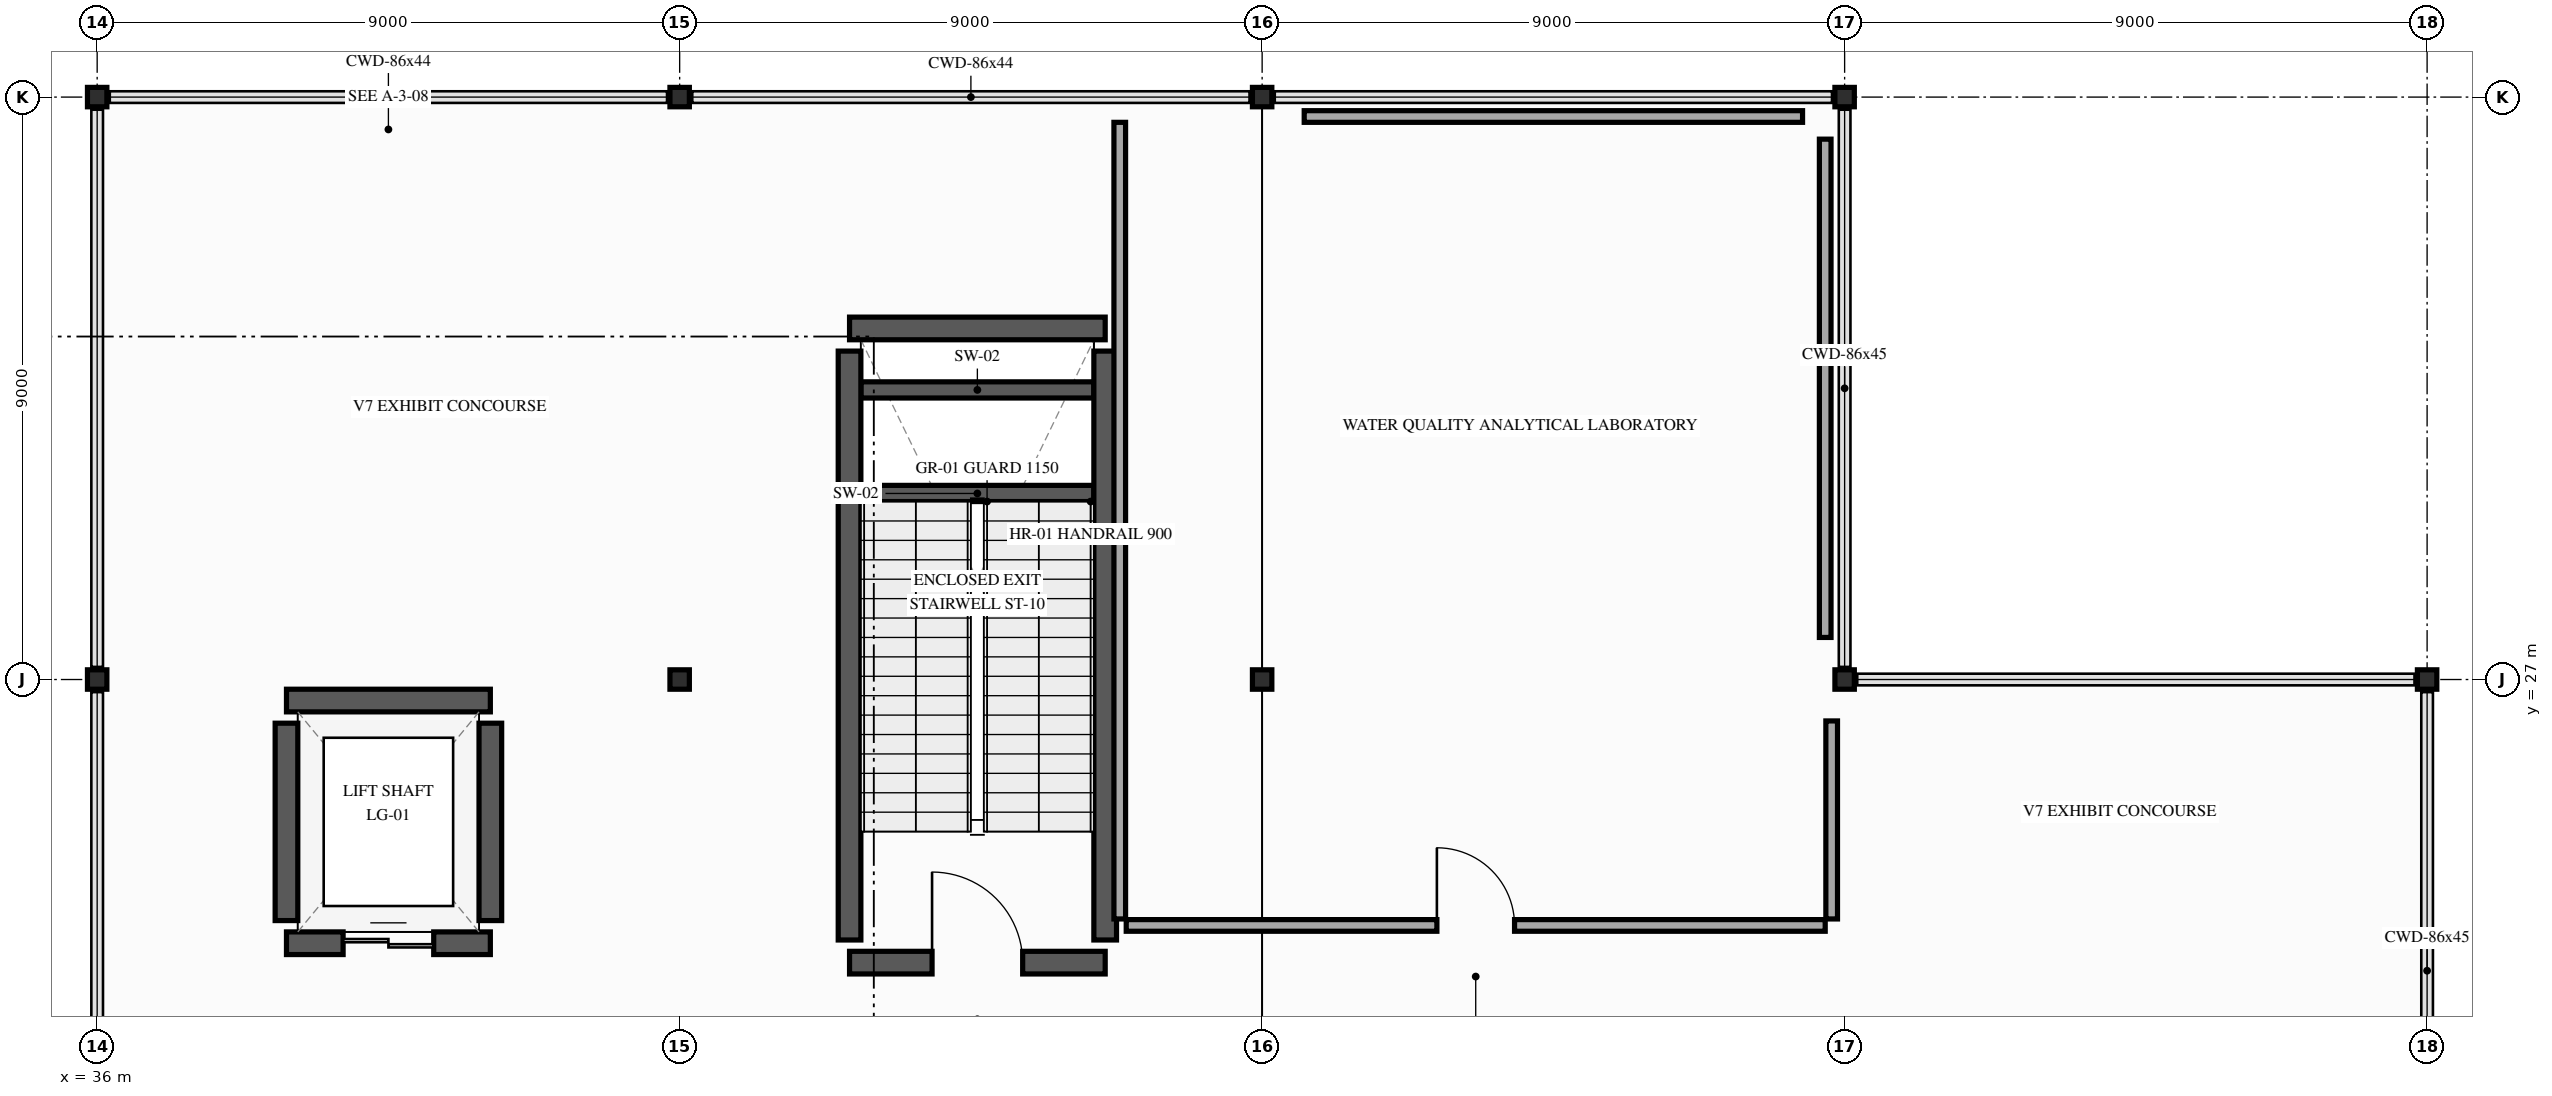
"""IFC4 building model, lengths in metres.
Left out: names, types, materials, properties, quantities, classifications, styles, units other than length and angle.
Written with IfcOpenShell. Run it as: python <this file> out.ifc"""

import sys

from ifc_helpers import new_model, si_unit, direction, frame, frame_2d, origin, origin_2d, place, context, subcontext, project, spatial, rectangle, i_section, extrude, element, fill, save


model = new_model("IFC4")
c1 = context("Model", 3, precision=1e-05, world=origin(), true_north=direction((0.0, 1.0)))
c2 = subcontext(c1, "Body", "Model", "MODEL_VIEW")
j1 = project(units=[si_unit("LENGTHUNIT", "METRE"), si_unit("PLANEANGLEUNIT", "RADIAN")], contexts=[c1])
p1 = place(None, origin())
s1 = spatial("IfcSite", under=j1, at=p1, CompositionType="ELEMENT")
p2 = place(p1, origin())
s2 = spatial("IfcBuilding", under=s1, at=p2, CompositionType="ELEMENT")
p3 = place(p2, frame((0.0, 0.0, 10.8)))
s3 = spatial("IfcBuildingStorey", under=s2, at=p3, CompositionType="ELEMENT", Elevation=10.8)
for number, where, z_axis, x_axis in (
    (1, (36.0, 27.0, 0.0), (0.0, 0.0, 1.0), (1.0, 0.0, 0.0)),
    (2, (36.0, 36.0, 0.0), (0.0, 0.0, 1.0), (1.0, 0.0, 0.0)),
    (3, (45.0, 27.0, 0.0), (0.0, 0.0, 1.0), (1.0, 0.0, 0.0)),
    (4, (45.0, 36.0, 0.0), (0.0, 0.0, 1.0), (1.0, 0.0, 0.0)),
    (5, (54.0, 27.0, 0.0), (0.0, 0.0, 1.0), (1.0, 0.0, 0.0)),
    (6, (54.0, 36.0, 0.0), (0.0, 0.0, 1.0), (1.0, 0.0, 0.0)),
    (7, (63.0, 27.0, 0.0), (0.0, 0.0, 1.0), (1.0, 0.0, 0.0)),
    (8, (63.0, 36.0, 0.0), (0.0, 0.0, 1.0), (1.0, 0.0, 0.0)),
    (9, (72.0, 27.0, 0.0), (0.0, 0.0, 1.0), (1.0, 0.0, 0.0)),
):
    element("IfcColumn", number, at=place(p3, frame(where, z_axis=z_axis, x_axis=x_axis)), inside=s3, PredefinedType="COLUMN", context=c2, shape_type="SweptSolid", body=[
        extrude(i_section(OverallWidth=0.3, OverallDepth=0.3, WebThickness=0.01, FlangeThickness=0.015, FilletRadius=0.018, at=origin_2d()), origin(), (0.0, 0.0, 1.0), 5.4),
    ])
for number, where, z_axis, x_axis in (
    (10, (47.8, 29.875, 0.0), (0.0, 0.0, 1.0), (1.0, 0.0, 0.0)),
    (11, (47.8, 31.475, 0.0), (0.0, 0.0, 1.0), (1.0, 0.0, 0.0)),
):
    element("IfcWall", number, at=place(p3, frame(where, z_axis=z_axis, x_axis=x_axis)), inside=s3, PredefinedType="SHEAR", context=c2, shape_type="SweptSolid", body=[
        extrude(rectangle(XDim=3.6, YDim=0.25, at=frame_2d((1.8, 0.0))), origin(), (0.0, 0.0, 1.0), 2.5),
    ])
p4 = place(p3, frame((47.625, 22.625, 0.0), z_axis=(0.0, 0.0, 1.0), x_axis=(1.0, 0.0, 0.0)))
e12 = element("IfcWall", 12, at=p4, inside=s3, PredefinedType="SHEAR", context=c2, shape_type="SweptSolid", body=[
    extrude(rectangle(XDim=3.95, YDim=0.35, at=frame_2d((1.975, 0.0))), origin(), (0.0, 0.0, 1.0), 5.16),
])
p5 = place(p4, frame((1.275, 0.0, 0.0)))
e13 = element("IfcOpeningElement", 13, at=p5, cuts=e12, PredefinedType="OPENING", context=c2, shape_type="SweptSolid", body=[
    extrude(rectangle(XDim=1.4, YDim=2.2, at=frame_2d((0.7, 1.1))), frame((0.0, 0.185, 0.0), z_axis=(0.0, -1.0, 0.0), x_axis=(1.0, 0.0, 0.0)), (0.0, 0.0, 1.0), 0.37),
])
p6 = place(p3, frame((47.625, 32.425, 0.0), z_axis=(0.0, 0.0, 1.0), x_axis=(1.0, 0.0, 0.0)))
e14 = element("IfcWall", 14, at=p6, inside=s3, PredefinedType="SHEAR", context=c2, shape_type="SweptSolid", body=[
    extrude(rectangle(XDim=3.95, YDim=0.35, at=frame_2d((1.975, 0.0))), origin(), (0.0, 0.0, 1.0), 5.16),
])
for number, where, z_axis, x_axis in (
    (15, (47.625, 22.975, 0.0), (0.0, 0.0, 1.0), (0.0, 1.0, 0.0)),
    (16, (51.575, 22.975, 0.0), (0.0, 0.0, 1.0), (0.0, 1.0, 0.0)),
):
    element("IfcWall", number, at=place(p3, frame(where, z_axis=z_axis, x_axis=x_axis)), inside=s3, PredefinedType="SHEAR", context=c2, shape_type="SweptSolid", body=[
        extrude(rectangle(XDim=9.1, YDim=0.35, at=frame_2d((4.55, 0.0))), origin(), (0.0, 0.0, 1.0), 5.16),
    ])
p7 = place(p3, frame((38.925, 22.925, 0.0), z_axis=(0.0, 0.0, 1.0), x_axis=(1.0, 0.0, 0.0)))
e17 = element("IfcWall", 17, at=p7, inside=s3, PredefinedType="SHEAR", context=c2, shape_type="SweptSolid", body=[
    extrude(rectangle(XDim=3.15, YDim=0.35, at=frame_2d((1.575, 0.0))), origin(), (0.0, 0.0, 1.0), 5.16),
])
p8 = place(p7, frame((0.875, 0.0, 0.0)))
e18 = element("IfcOpeningElement", 18, at=p8, cuts=e17, PredefinedType="OPENING", context=c2, shape_type="SweptSolid", body=[
    extrude(rectangle(XDim=1.4, YDim=2.3, at=frame_2d((0.7, 1.15))), frame((0.0, 0.185, 0.0), z_axis=(0.0, -1.0, 0.0), x_axis=(1.0, 0.0, 0.0)), (0.0, 0.0, 1.0), 0.37),
])
p9 = place(p3, frame((42.075, 26.675, 0.0), z_axis=(0.0, 0.0, 1.0), x_axis=(-1.0, 0.0, 0.0)))
e19 = element("IfcWall", 19, at=p9, inside=s3, PredefinedType="SHEAR", context=c2, shape_type="SweptSolid", body=[
    extrude(rectangle(XDim=3.15, YDim=0.35, at=frame_2d((1.575, 0.0))), origin(), (0.0, 0.0, 1.0), 5.16),
])
for number, where, z_axis, x_axis in (
    (20, (38.925, 23.275, 0.0), (0.0, 0.0, 1.0), (0.0, 1.0, 0.0)),
    (21, (42.075, 23.275, 0.0), (0.0, 0.0, 1.0), (0.0, 1.0, 0.0)),
):
    element("IfcWall", number, at=place(p3, frame(where, z_axis=z_axis, x_axis=x_axis)), inside=s3, PredefinedType="SHEAR", context=c2, shape_type="SweptSolid", body=[
        extrude(rectangle(XDim=3.05, YDim=0.35, at=frame_2d((1.525, 0.0))), origin(), (0.0, 0.0, 1.0), 5.16),
    ])
p10 = place(p3, frame((51.8, 35.61, 0.0), z_axis=(0.0, 0.0, 1.0), x_axis=(0.0, -1.0, 0.0)))
e22 = element("IfcWall", 22, at=p10, inside=s3, PredefinedType="PARTITIONING", context=c2, shape_type="SweptSolid", body=[
    extrude(rectangle(XDim=12.31, YDim=0.18, at=frame_2d((6.155, 0.0))), origin(), (0.0, 0.0, 1.0), 4.447),
])
p11 = place(p3, frame((51.9, 23.2, 0.0), z_axis=(0.0, 0.0, 1.0), x_axis=(1.0, 0.0, 0.0)))
e23 = element("IfcWall", 23, at=p11, inside=s3, PredefinedType="PARTITIONING", context=c2, shape_type="SweptSolid", body=[
    extrude(rectangle(XDim=10.8, YDim=0.18, at=frame_2d((5.4, 0.0))), origin(), (0.0, 0.0, 1.0), 4.547),
])
p12 = place(p11, frame((4.8, 0.0, 0.0)))
e24 = element("IfcOpeningElement", 24, at=p12, cuts=e23, PredefinedType="OPENING", context=c2, shape_type="SweptSolid", body=[
    extrude(rectangle(XDim=1.2, YDim=2.2, at=frame_2d((0.6, 1.1))), frame((0.0, 0.1, 0.0), z_axis=(0.0, -1.0, 0.0), x_axis=(1.0, 0.0, 0.0)), (0.0, 0.0, 1.0), 0.2),
])
p13 = place(p3, frame((62.8, 23.3, 0.0), z_axis=(0.0, 0.0, 1.0), x_axis=(0.0, 1.0, 0.0)))
e25 = element("IfcWall", 25, at=p13, inside=s3, PredefinedType="PARTITIONING", context=c2, shape_type="SweptSolid", body=[
    extrude(rectangle(XDim=3.06, YDim=0.18, at=frame_2d((1.53, 0.0))), origin(), (0.0, 0.0, 1.0), 4.535),
])
p14 = place(p3, frame((62.7, 27.65, 0.0), z_axis=(0.0, 0.0, 1.0), x_axis=(0.0, 1.0, 0.0)))
e26 = element("IfcWall", 26, at=p14, inside=s3, PredefinedType="PARTITIONING", context=c2, shape_type="SweptSolid", body=[
    extrude(rectangle(XDim=7.7, YDim=0.18, at=frame_2d((3.85, 0.0))), origin(), (0.0, 0.0, 1.0), 4.547),
])
p15 = place(p3, frame((62.35, 35.7, 0.0), z_axis=(0.0, 0.0, 1.0), x_axis=(-1.0, 0.0, 0.0)))
e27 = element("IfcWall", 27, at=p15, inside=s3, PredefinedType="PARTITIONING", context=c2, shape_type="SweptSolid", body=[
    extrude(rectangle(XDim=7.7, YDim=0.18, at=frame_2d((3.85, 0.0))), origin(), (0.0, 0.0, 1.0), 4.447),
])
p16 = place(p5, origin())
e28 = element("IfcDoor", 28, at=p16, inside=s3, OperationType="SINGLE_SWING_LEFT", PredefinedType="DOOR", context=c2, shape_type="SweptSolid", body=[
    extrude(rectangle(XDim=1.4, YDim=2.2, at=frame_2d((0.7, 1.1))), frame((0.0, 0.025, 0.0), z_axis=(0.0, -1.0, 0.0), x_axis=(1.0, 0.0, 0.0)), (0.0, 0.0, 1.0), 0.05),
])
fill(e13, e28)
p17 = place(p8, origin())
e29 = element("IfcDoor", 29, at=p17, inside=s3, OperationType="DOUBLE_DOOR_SLIDING", PredefinedType="DOOR", context=c2, shape_type="SweptSolid", body=[
    extrude(rectangle(XDim=1.4, YDim=2.3, at=frame_2d((0.7, 1.15))), frame((0.0, 0.025, 0.0), z_axis=(0.0, -1.0, 0.0), x_axis=(1.0, 0.0, 0.0)), (0.0, 0.0, 1.0), 0.05),
])
fill(e18, e29)
p18 = place(p12, origin())
e30 = element("IfcDoor", 30, at=p18, inside=s3, OperationType="SINGLE_SWING_LEFT", PredefinedType="DOOR", context=c2, shape_type="SweptSolid", body=[
    extrude(rectangle(XDim=1.2, YDim=2.2, at=frame_2d((0.6, 1.1))), frame((0.0, 0.025, 0.0), z_axis=(0.0, -1.0, 0.0), x_axis=(1.0, 0.0, 0.0)), (0.0, 0.0, 1.0), 0.05),
])
fill(e24, e30)
save(model, sys.argv[1])
